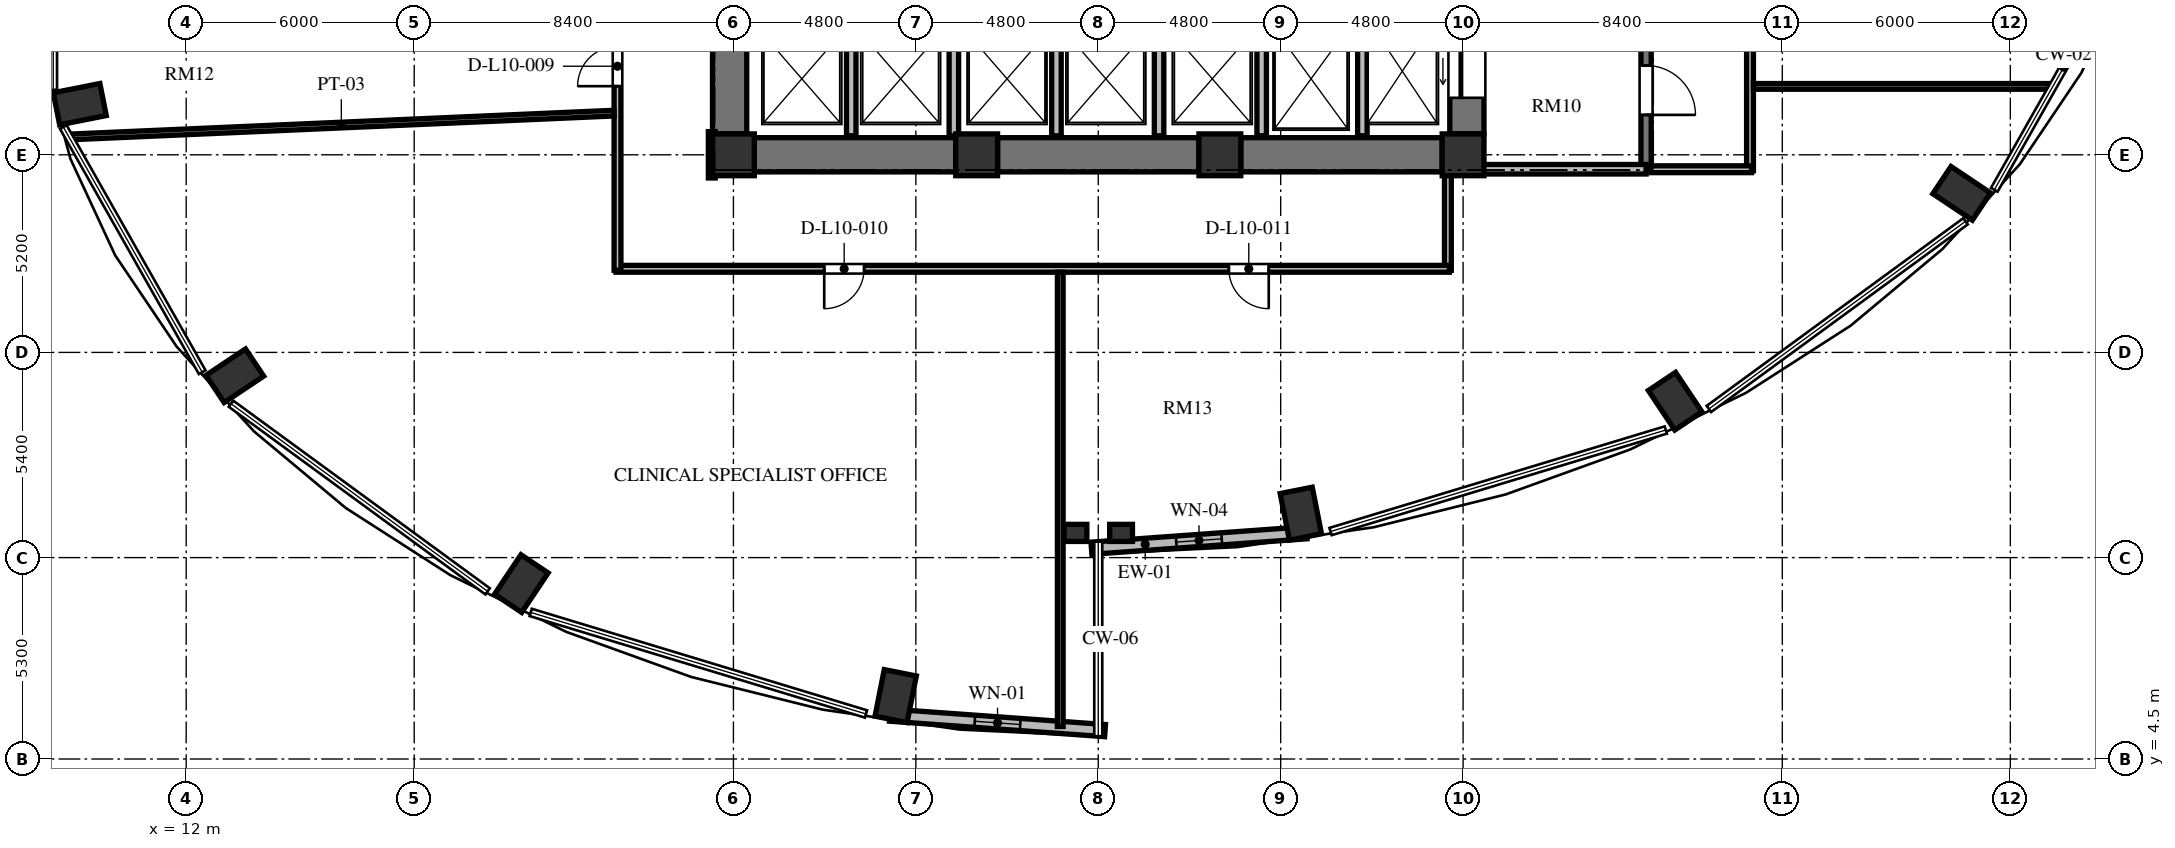
"""IFC4 building model, lengths in metres.
Left out: names, types, materials, properties, quantities, classifications, styles, units other than length and angle.
Written with IfcOpenShell. Run it as: python <this file> out.ifc"""

import sys

from ifc_helpers import new_model, si_unit, direction, frame, frame_2d, origin, origin_2d, place, context, subcontext, project, spatial, rectangle, extrude, element, fill, save


model = new_model("IFC4")
c1 = context("Model", 3, precision=1e-05, world=origin(), true_north=direction((0.0, 1.0)))
c2 = subcontext(c1, "Body", "Model", "MODEL_VIEW")
j1 = project(units=[si_unit("LENGTHUNIT", "METRE"), si_unit("PLANEANGLEUNIT", "RADIAN")], contexts=[c1])
p1 = place(None, origin())
s1 = spatial("IfcSite", under=j1, at=p1, CompositionType="ELEMENT")
p2 = place(p1, origin())
s2 = spatial("IfcBuilding", under=s1, at=p2, CompositionType="ELEMENT")
p3 = place(p2, frame((0.0, 0.0, 43.44)))
s3 = spatial("IfcBuildingStorey", under=s2, at=p3, CompositionType="ELEMENT", Elevation=43.44)
for number, where, z_axis, x_axis in (
    (1, (41.331, 10.956, 0.0), (0.0, 0.0, 1.0), (0.195, -0.981, 0.0)),
    (2, (51.181, 13.916, 0.0), (0.0, 0.0, 1.0), (0.556, -0.831, 0.0)),
    (3, (58.72, 19.386, 0.0), (0.0, 0.0, 1.0), (0.831, -0.556, 0.0)),
    (4, (9.2, 21.732, 0.0), (0.0, 0.0, 1.0), (-0.981, -0.195, 0.0)),
    (5, (13.28, 14.586, 0.0), (0.0, 0.0, 1.0), (-0.831, -0.556, 0.0)),
    (6, (20.819, 9.116, 0.0), (0.0, 0.0, 1.0), (-0.556, -0.831, 0.0)),
    (7, (30.669, 6.156, 0.0), (0.0, 0.0, 1.0), (-0.195, -0.981, 0.0)),
):
    element("IfcColumn", number, at=place(p3, frame(where, z_axis=z_axis, x_axis=x_axis)), inside=s3, PredefinedType="COLUMN", context=c2, shape_type="SweptSolid", body=[
        extrude(rectangle(XDim=1.25, YDim=0.86, at=origin_2d()), origin(), (0.0, 0.0, 1.0), 3.648),
    ])
for number, where, z_axis, x_axis in (
    (8, (26.4, 20.4, 0.0), (0.0, 0.0, 1.0), (1.0, 0.0, 0.0)),
    (9, (32.8, 20.4, 0.0), (0.0, 0.0, 1.0), (1.0, 0.0, 0.0)),
    (10, (39.2, 20.4, 0.0), (0.0, 0.0, 1.0), (1.0, 0.0, 0.0)),
    (11, (45.6, 20.4, 0.0), (0.0, 0.0, 1.0), (1.0, 0.0, 0.0)),
):
    element("IfcColumn", number, at=place(p3, frame(where, z_axis=z_axis, x_axis=x_axis)), inside=s3, PredefinedType="COLUMN", context=c2, shape_type="SweptSolid", body=[
        extrude(rectangle(XDim=1.1, YDim=1.1, at=origin_2d()), origin(), (0.0, 0.0, 1.0), 3.648),
    ])
for number, where, z_axis, x_axis in (
    (12, (35.4, 10.45, 0.0), (0.0, 0.0, 1.0), (1.0, 0.0, 0.0)),
    (13, (36.6, 10.45, 0.0), (0.0, 0.0, 1.0), (1.0, 0.0, 0.0)),
):
    element("IfcColumn", number, at=place(p3, frame(where, z_axis=z_axis, x_axis=x_axis)), inside=s3, PredefinedType="PILASTER", context=c2, shape_type="SweptSolid", body=[
        extrude(rectangle(XDim=0.6, YDim=0.45, at=origin_2d()), origin(), (0.0, 0.0, 1.0), 3.648),
    ])
p4 = place(p3, frame((26.3, 20.95, 0.0), z_axis=(0.0, 0.0, 1.0), x_axis=(0.0, 1.0, 0.0)))
e14 = element("IfcWall", 14, at=p4, inside=s3, PredefinedType="SHEAR", context=c2, shape_type="SweptSolid", body=[
    extrude(rectangle(XDim=14.1, YDim=0.9, at=frame_2d((7.05, 0.0))), origin(), (0.0, 0.0, 1.0), 3.648),
])
p5 = place(p4, frame((6.5, 0.0, 0.0)))
e15 = element("IfcOpeningElement", 15, at=p5, cuts=e14, PredefinedType="OPENING", context=c2, shape_type="SweptSolid", body=[
    extrude(rectangle(XDim=1.2, YDim=2.15, at=frame_2d((0.6, 1.075))), frame((0.0, 0.46, 0.0), z_axis=(0.0, -1.0, 0.0), x_axis=(1.0, 0.0, 0.0)), (0.0, 0.0, 1.0), 0.92),
])
p6 = place(p4, frame((9.6, 0.0, 0.0)))
e16 = element("IfcOpeningElement", 16, at=p6, cuts=e14, PredefinedType="OPENING", context=c2, shape_type="SweptSolid", body=[
    extrude(rectangle(XDim=1.3, YDim=2.2, at=frame_2d((0.65, 1.1))), frame((0.0, 0.46, 0.0), z_axis=(0.0, -1.0, 0.0), x_axis=(1.0, 0.0, 0.0)), (0.0, 0.0, 1.0), 0.92),
])
p7 = place(p4, frame((3.26, 0.0, 0.0)))
e17 = element("IfcOpeningElement", 17, at=p7, cuts=e14, PredefinedType="OPENING", context=c2, shape_type="SweptSolid", body=[
    extrude(rectangle(XDim=1.3, YDim=2.2, at=frame_2d((0.65, 1.1))), frame((0.0, 0.46, 0.0), z_axis=(0.0, -1.0, 0.0), x_axis=(1.0, 0.0, 0.0)), (0.0, 0.0, 1.0), 0.92),
])
p8 = place(p3, frame((45.7, 20.95, 0.0), z_axis=(0.0, 0.0, 1.0), x_axis=(0.0, 1.0, 0.0)))
e18 = element("IfcWall", 18, at=p8, inside=s3, PredefinedType="SHEAR", context=c2, shape_type="SweptSolid", body=[
    extrude(rectangle(XDim=14.1, YDim=0.9, at=frame_2d((7.05, 0.0))), origin(), (0.0, 0.0, 1.0), 3.648),
])
p9 = place(p8, frame((11.75, 0.0, 0.0)))
e19 = element("IfcOpeningElement", 19, at=p9, cuts=e18, PredefinedType="OPENING", context=c2, shape_type="SweptSolid", body=[
    extrude(rectangle(XDim=1.4, YDim=2.3, at=frame_2d((0.7, 1.15))), frame((0.0, 0.46, 0.0), z_axis=(0.0, -1.0, 0.0), x_axis=(1.0, 0.0, 0.0)), (0.0, 0.0, 1.0), 0.92),
])
p10 = place(p8, frame((0.95, 0.0, 0.0)))
e20 = element("IfcOpeningElement", 20, at=p10, cuts=e18, PredefinedType="OPENING", context=c2, shape_type="SweptSolid", body=[
    extrude(rectangle(XDim=1.4, YDim=2.3, at=frame_2d((0.7, 1.15))), frame((0.0, 0.46, 0.0), z_axis=(0.0, -1.0, 0.0), x_axis=(1.0, 0.0, 0.0)), (0.0, 0.0, 1.0), 0.92),
])
p11 = place(p3, frame((26.95, 20.4, 0.0), z_axis=(0.0, 0.0, 1.0), x_axis=(1.0, 0.0, 0.0)))
e21 = element("IfcWall", 21, at=p11, inside=s3, PredefinedType="SHEAR", context=c2, shape_type="SweptSolid", body=[
    extrude(rectangle(XDim=5.3, YDim=0.9, at=frame_2d((2.65, 0.0))), origin(), (0.0, 0.0, 1.0), 3.648),
])
p12 = place(p3, frame((33.35, 20.4, 0.0), z_axis=(0.0, 0.0, 1.0), x_axis=(1.0, 0.0, 0.0)))
e22 = element("IfcWall", 22, at=p12, inside=s3, PredefinedType="SHEAR", context=c2, shape_type="SweptSolid", body=[
    extrude(rectangle(XDim=5.3, YDim=0.9, at=frame_2d((2.65, 0.0))), origin(), (0.0, 0.0, 1.0), 3.648),
])
p13 = place(p3, frame((39.75, 20.4, 0.0), z_axis=(0.0, 0.0, 1.0), x_axis=(1.0, 0.0, 0.0)))
e23 = element("IfcWall", 23, at=p13, inside=s3, PredefinedType="SHEAR", context=c2, shape_type="SweptSolid", body=[
    extrude(rectangle(XDim=5.3, YDim=0.9, at=frame_2d((2.65, 0.0))), origin(), (0.0, 0.0, 1.0), 3.648),
])
p14 = place(p3, frame((35.821, 10.047, 0.0), z_axis=(0.0, 0.0, 1.0), x_axis=(0.997422321809, 0.071754525696, 0.0)))
e24 = element("IfcWall", 24, at=p14, inside=s3, PredefinedType="SOLIDWALL", context=c2, shape_type="SweptSolid", body=[
    extrude(rectangle(XDim=5.675, YDim=0.32, at=frame_2d((2.838, 0.0))), origin(), (0.0, 0.0, 1.0), 3.428),
])
p15 = place(p14, frame((2.238, 0.0, 0.85)))
e25 = element("IfcOpeningElement", 25, at=p15, cuts=e24, PredefinedType="OPENING", context=c2, shape_type="SweptSolid", body=[
    extrude(rectangle(XDim=1.2, YDim=1.8, at=frame_2d((0.6, 0.9))), frame((0.0, 0.17, 0.0), z_axis=(0.0, -1.0, 0.0), x_axis=(1.0, 0.0, 0.0)), (0.0, 0.0, 1.0), 0.34),
])
p16 = place(p3, frame((30.519, 5.654, 0.0), z_axis=(0.0, 0.0, 1.0), x_axis=(0.997421878774, -0.071760683825, 0.0)))
e26 = element("IfcWall", 26, at=p16, inside=s3, PredefinedType="SOLIDWALL", context=c2, shape_type="SweptSolid", body=[
    extrude(rectangle(XDim=5.675, YDim=0.32, at=frame_2d((2.837, 0.0))), origin(), (0.0, 0.0, 1.0), 3.428),
])
p17 = place(p16, frame((2.237, 0.0, 0.85)))
e27 = element("IfcOpeningElement", 27, at=p17, cuts=e26, PredefinedType="OPENING", context=c2, shape_type="SweptSolid", body=[
    extrude(rectangle(XDim=1.2, YDim=2.2, at=frame_2d((0.6, 1.1))), frame((0.0, 0.17, 0.0), z_axis=(0.0, -1.0, 0.0), x_axis=(1.0, 0.0, 0.0)), (0.0, 0.0, 1.0), 0.34),
])
p18 = place(p3, frame((42.95, 20.9, 0.0), z_axis=(0.0, 0.0, 1.0), x_axis=(0.0, 1.0, 0.0)))
e28 = element("IfcWall", 28, at=p18, inside=s3, PredefinedType="SOLIDWALL", context=c2, shape_type="SweptSolid", body=[
    extrude(rectangle(XDim=3.2, YDim=0.25, at=frame_2d((1.6, 0.0))), origin(), (0.0, 0.0, 1.0), 3.428),
])
for number, where, z_axis, x_axis in (
    (29, (29.5, 20.9, 0.0), (0.0, 0.0, 1.0), (0.0, 1.0, 0.0)),
    (30, (32.2, 20.9, 0.0), (0.0, 0.0, 1.0), (0.0, 1.0, 0.0)),
    (31, (34.9, 20.9, 0.0), (0.0, 0.0, 1.0), (0.0, 1.0, 0.0)),
    (32, (37.6, 20.9, 0.0), (0.0, 0.0, 1.0), (0.0, 1.0, 0.0)),
    (33, (40.3, 20.9, 0.0), (0.0, 0.0, 1.0), (0.0, 1.0, 0.0)),
):
    element("IfcWall", number, at=place(p3, frame(where, z_axis=z_axis, x_axis=x_axis)), inside=s3, PredefinedType="SOLIDWALL", context=c2, shape_type="SweptSolid", body=[
        extrude(rectangle(XDim=2.8, YDim=0.25, at=frame_2d((1.4, 0.0))), origin(), (0.0, 0.0, 1.0), 3.428),
    ])
p19 = place(p3, frame((50.415, 35.845, 0.0), z_axis=(0.0, 0.0, 1.0), x_axis=(0.0, -1.0, 0.0)))
e34 = element("IfcWall", 34, at=p19, inside=s3, PredefinedType="SHEAR", context=c2, shape_type="SweptSolid", body=[
    extrude(rectangle(XDim=15.825, YDim=0.27, at=frame_2d((7.913, 0.0))), origin(), (0.0, 0.0, 1.0), 3.648),
])
p20 = place(p19, frame((4.445, 0.0, 0.0)))
e35 = element("IfcOpeningElement", 35, at=p20, cuts=e34, PredefinedType="OPENING", context=c2, shape_type="SweptSolid", body=[
    extrude(rectangle(XDim=1.2, YDim=2.15, at=frame_2d((0.6, 1.075))), frame((0.0, 0.145, 0.0), z_axis=(0.0, -1.0, 0.0), x_axis=(1.0, 0.0, 0.0)), (0.0, 0.0, 1.0), 0.29),
])
p21 = place(p19, frame((1.295, 0.0, 0.0)))
e36 = element("IfcOpeningElement", 36, at=p21, cuts=e34, PredefinedType="OPENING", context=c2, shape_type="SweptSolid", body=[
    extrude(rectangle(XDim=1.3, YDim=2.2, at=frame_2d((0.65, 1.1))), frame((0.0, 0.145, 0.0), z_axis=(0.0, -1.0, 0.0), x_axis=(1.0, 0.0, 0.0)), (0.0, 0.0, 1.0), 0.29),
])
p22 = place(p19, frame((13.095, 0.0, 0.0)))
e37 = element("IfcOpeningElement", 37, at=p22, cuts=e34, PredefinedType="OPENING", context=c2, shape_type="SweptSolid", body=[
    extrude(rectangle(XDim=1.3, YDim=2.2, at=frame_2d((0.65, 1.1))), frame((0.0, 0.145, 0.0), z_axis=(0.0, -1.0, 0.0), x_axis=(1.0, 0.0, 0.0)), (0.0, 0.0, 1.0), 0.29),
])
p23 = place(p3, frame((45.7, 20.02, 0.0), z_axis=(0.0, 0.0, 1.0), x_axis=(1.0, 0.0, 0.0)))
e38 = element("IfcWall", 38, at=p23, inside=s3, PredefinedType="SOLIDWALL", context=c2, shape_type="SweptSolid", body=[
    extrude(rectangle(XDim=4.715, YDim=0.25, at=frame_2d((2.357, 0.0))), origin(), (0.0, 0.0, 1.0), 2.813),
])
p24 = place(p3, frame((53.15, 26.64, 0.0), z_axis=(0.0, 0.0, 1.0), x_axis=(0.0, -1.0, 0.0)))
e39 = element("IfcWall", 39, at=p24, inside=s3, PredefinedType="PARTITIONING", context=c2, shape_type="SweptSolid", body=[
    extrude(rectangle(XDim=6.66, YDim=0.18, at=frame_2d((3.33, 0.0))), origin(), (0.0, 0.0, 1.0), 3.428),
])
p25 = place(p3, frame((53.19, 20.02, 0.0), z_axis=(0.0, 0.0, 1.0), x_axis=(-1.0, 0.0, 0.0)))
e40 = element("IfcWall", 40, at=p25, inside=s3, PredefinedType="PARTITIONING", context=c2, shape_type="SweptSolid", body=[
    extrude(rectangle(XDim=2.65, YDim=0.18, at=frame_2d((1.325, 0.0))), origin(), (0.0, 0.0, 1.0), 2.813),
])
p26 = place(p3, frame((25.83, 21.01, 0.0), z_axis=(0.0, 0.0, 1.0), x_axis=(0.0, -1.0, 0.0)))
e41 = element("IfcWall", 41, at=p26, inside=s3, PredefinedType="PARTITIONING", context=c2, shape_type="SweptSolid", body=[
    extrude(rectangle(XDim=1.22, YDim=0.18, at=frame_2d((0.61, 0.0))), origin(), (0.0, 0.0, 1.0), 3.428),
])
p27 = place(p3, frame((45.2, 19.91, 0.0), z_axis=(0.0, 0.0, 1.0), x_axis=(0.0, -1.0, 0.0)))
e42 = element("IfcWall", 42, at=p27, inside=s3, PredefinedType="PARTITIONING", context=c2, shape_type="SweptSolid", body=[
    extrude(rectangle(XDim=2.55, YDim=0.18, at=frame_2d((1.275, 0.0))), origin(), (0.0, 0.0, 1.0), 3.428),
])
p28 = place(p3, frame((45.24, 17.4, 0.0), z_axis=(0.0, 0.0, 1.0), x_axis=(-1.0, 0.0, 0.0)))
e43 = element("IfcWall", 43, at=p28, inside=s3, PredefinedType="PARTITIONING", context=c2, shape_type="SweptSolid", body=[
    extrude(rectangle(XDim=21.93, YDim=0.18, at=frame_2d((10.965, 0.0))), origin(), (0.0, 0.0, 1.0), 3.053),
])
p29 = place(p28, frame((15.401, 0.0, 0.0)))
e44 = element("IfcOpeningElement", 44, at=p29, cuts=e43, PredefinedType="OPENING", context=c2, shape_type="SweptSolid", body=[
    extrude(rectangle(XDim=1.05, YDim=2.15, at=frame_2d((0.525, 1.075))), frame((0.0, 0.1, 0.0), z_axis=(0.0, -1.0, 0.0), x_axis=(1.0, 0.0, 0.0)), (0.0, 0.0, 1.0), 0.2),
])
p30 = place(p28, frame((4.754, 0.0, 0.0)))
e45 = element("IfcOpeningElement", 45, at=p30, cuts=e43, PredefinedType="OPENING", context=c2, shape_type="SweptSolid", body=[
    extrude(rectangle(XDim=1.05, YDim=2.15, at=frame_2d((0.525, 1.075))), frame((0.0, 0.1, 0.0), z_axis=(0.0, -1.0, 0.0), x_axis=(1.0, 0.0, 0.0)), (0.0, 0.0, 1.0), 0.2),
])
p31 = place(p3, frame((23.35, 17.36, 0.0), z_axis=(0.0, 0.0, 1.0), x_axis=(0.0, 1.0, 0.0)))
e46 = element("IfcWall", 46, at=p31, inside=s3, PredefinedType="PARTITIONING", context=c2, shape_type="SweptSolid", body=[
    extrude(rectangle(XDim=9.28, YDim=0.18, at=frame_2d((4.64, 0.0))), origin(), (0.0, 0.0, 1.0), 3.428),
])
p32 = place(p31, frame((4.846, 0.0, 0.0)))
e47 = element("IfcOpeningElement", 47, at=p32, cuts=e46, PredefinedType="OPENING", context=c2, shape_type="SweptSolid", body=[
    extrude(rectangle(XDim=1.05, YDim=2.15, at=frame_2d((0.525, 1.075))), frame((0.0, 0.1, 0.0), z_axis=(0.0, -1.0, 0.0), x_axis=(1.0, 0.0, 0.0)), (0.0, 0.0, 1.0), 0.2),
])
p33 = place(p3, frame((8.905, 20.868, 0.0), z_axis=(0.0, 0.0, 1.0), x_axis=(0.999043936959, 0.043717411007, 0.0)))
e48 = element("IfcWall", 48, at=p33, inside=s3, PredefinedType="PARTITIONING", context=c2, shape_type="SweptSolid", body=[
    extrude(rectangle(XDim=14.369, YDim=0.15, at=frame_2d((7.185, 0.0))), origin(), (0.0, 0.0, 1.0), 2.813),
])
p34 = place(p3, frame((53.24, 22.2, 0.0), z_axis=(0.0, 0.0, 1.0), x_axis=(1.0, 0.0, 0.0)))
e49 = element("IfcWall", 49, at=p34, inside=s3, PredefinedType="PARTITIONING", context=c2, shape_type="SweptSolid", body=[
    extrude(rectangle(XDim=7.875, YDim=0.15, at=frame_2d((3.938, 0.0))), origin(), (0.0, 0.0, 1.0), 3.428),
])
p35 = place(p3, frame((35.0, 5.356, 0.0), z_axis=(0.0, 0.0, 1.0), x_axis=(0.0, 1.0, 0.0)))
e50 = element("IfcWall", 50, at=p35, inside=s3, PredefinedType="PARTITIONING", context=c2, shape_type="SweptSolid", body=[
    extrude(rectangle(XDim=11.954, YDim=0.15, at=frame_2d((5.977, 0.0))), origin(), (0.0, 0.0, 1.0), 3.428),
])
p36 = place(p15, origin())
e51 = element("IfcWindow", 51, at=p36, inside=s3, PartitioningType="SINGLE_PANEL", PredefinedType="WINDOW", context=c2, shape_type="SweptSolid", body=[
    extrude(rectangle(XDim=1.2, YDim=1.8, at=frame_2d((0.6, 0.9))), frame((0.0, 0.03, 0.0), z_axis=(0.0, -1.0, 0.0), x_axis=(1.0, 0.0, 0.0)), (0.0, 0.0, 1.0), 0.06),
])
fill(e25, e51)
p37 = place(p17, origin())
e52 = element("IfcWindow", 52, at=p37, inside=s3, PartitioningType="SINGLE_PANEL", PredefinedType="WINDOW", context=c2, shape_type="SweptSolid", body=[
    extrude(rectangle(XDim=1.2, YDim=2.2, at=frame_2d((0.6, 1.1))), frame((0.0, 0.03, 0.0), z_axis=(0.0, -1.0, 0.0), x_axis=(1.0, 0.0, 0.0)), (0.0, 0.0, 1.0), 0.06),
])
fill(e27, e52)
p38 = place(p10, origin())
e53 = element("IfcDoor", 53, at=p38, inside=s3, OperationType="SLIDING_TO_LEFT", PredefinedType="DOOR", context=c2, shape_type="SweptSolid", body=[
    extrude(rectangle(XDim=1.4, YDim=2.3, at=frame_2d((0.7, 1.15))), frame((0.0, 0.025, 0.0), z_axis=(0.0, -1.0, 0.0), x_axis=(1.0, 0.0, 0.0)), (0.0, 0.0, 1.0), 0.05),
])
fill(e20, e53)
p39 = place(p22, origin())
e54 = element("IfcDoor", 54, at=p39, inside=s3, OperationType="SINGLE_SWING_RIGHT", PredefinedType="DOOR", context=c2, shape_type="SweptSolid", body=[
    extrude(rectangle(XDim=1.3, YDim=2.2, at=frame_2d((0.65, 1.1))), frame((0.0, 0.025, 0.0), z_axis=(0.0, -1.0, 0.0), x_axis=(1.0, 0.0, 0.0)), (0.0, 0.0, 1.0), 0.05),
])
fill(e37, e54)
p40 = place(p32, origin())
e55 = element("IfcDoor", 55, at=p40, inside=s3, OperationType="SINGLE_SWING_LEFT", PredefinedType="DOOR", context=c2, shape_type="SweptSolid", body=[
    extrude(rectangle(XDim=1.05, YDim=2.15, at=frame_2d((0.525, 1.075))), frame((0.0, 0.025, 0.0), z_axis=(0.0, -1.0, 0.0), x_axis=(1.0, 0.0, 0.0)), (0.0, 0.0, 1.0), 0.05),
])
fill(e47, e55)
p41 = place(p29, origin())
e56 = element("IfcDoor", 56, at=p41, inside=s3, OperationType="SINGLE_SWING_RIGHT", PredefinedType="DOOR", context=c2, shape_type="SweptSolid", body=[
    extrude(rectangle(XDim=1.05, YDim=2.15, at=frame_2d((0.525, 1.075))), frame((0.0, 0.025, 0.0), z_axis=(0.0, -1.0, 0.0), x_axis=(1.0, 0.0, 0.0)), (0.0, 0.0, 1.0), 0.05),
])
fill(e44, e56)
p42 = place(p30, origin())
e57 = element("IfcDoor", 57, at=p42, inside=s3, OperationType="SINGLE_SWING_LEFT", PredefinedType="DOOR", context=c2, shape_type="SweptSolid", body=[
    extrude(rectangle(XDim=1.05, YDim=2.15, at=frame_2d((0.525, 1.075))), frame((0.0, 0.025, 0.0), z_axis=(0.0, -1.0, 0.0), x_axis=(1.0, 0.0, 0.0)), (0.0, 0.0, 1.0), 0.05),
])
fill(e45, e57)
save(model, sys.argv[1])
